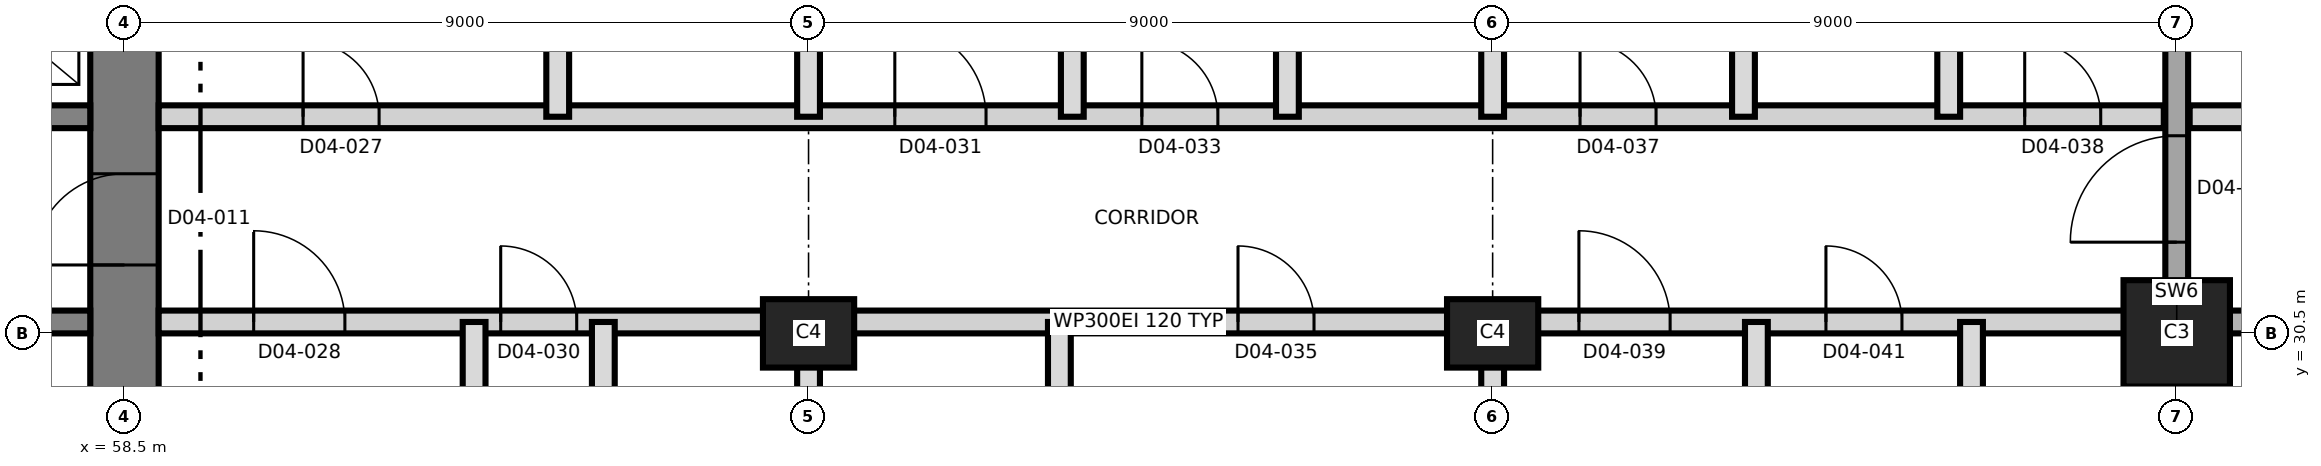
"""IFC4 building model, lengths in metres.
Left out: names, types, materials, properties, quantities, classifications, styles, units other than length and angle.
Written with IfcOpenShell. Run it as: python <this file> out.ifc"""

import sys

from ifc_helpers import new_model, si_unit, direction, frame, frame_2d, origin, origin_2d, place, context, subcontext, project, spatial, rectangle, extrude, element, fill, save


model = new_model("IFC4")
c1 = context("Model", 3, precision=1e-05, world=origin(), true_north=direction((0.0, 1.0)))
c2 = subcontext(c1, "Body", "Model", "MODEL_VIEW")
j1 = project(units=[si_unit("LENGTHUNIT", "METRE"), si_unit("PLANEANGLEUNIT", "RADIAN")], contexts=[c1])
p1 = place(None, origin())
s1 = spatial("IfcSite", under=j1, at=p1, CompositionType="ELEMENT")
p2 = place(p1, origin())
s2 = spatial("IfcBuilding", under=s1, at=p2, CompositionType="ELEMENT")
p3 = place(p2, frame((0.0, 0.0, 63.1)))
s3 = spatial("IfcBuildingStorey", under=s2, at=p3, CompositionType="ELEMENT", Elevation=63.1)
p4 = place(p3, frame((58.5, 21.05, 0.0), z_axis=(0.0, 0.0, 1.0), x_axis=(0.0, 1.0, 0.0)))
e1 = element("IfcWall", 1, at=p4, inside=s3, PredefinedType="SHEAR", context=c2, shape_type="SweptSolid", body=[
    extrude(rectangle(XDim=18.9, YDim=0.9, at=frame_2d((9.45, 0.0))), origin(), (0.0, 0.0, 1.0), 3.7),
])
p5 = place(p4, frame((10.35, 0.0, 0.0)))
e2 = element("IfcOpeningElement", 2, at=p5, cuts=e1, PredefinedType="OPENING", context=c2, shape_type="SweptSolid", body=[
    extrude(rectangle(XDim=1.2, YDim=2.1, at=frame_2d((0.6, 1.05))), frame((0.0, 0.46, 0.0), z_axis=(0.0, -1.0, 0.0), x_axis=(1.0, 0.0, 0.0)), (0.0, 0.0, 1.0), 0.92),
])
p6 = place(p3, frame((31.95, 30.65, 0.0), z_axis=(0.0, 0.0, 1.0), x_axis=(1.0, 0.0, 0.0)))
e3 = element("IfcWall", 3, at=p6, inside=s3, PredefinedType="SHEAR", context=c2, shape_type="SweptSolid", body=[
    extrude(rectangle(XDim=26.1, YDim=0.3, at=frame_2d((13.05, 0.0))), origin(), (0.0, 0.0, 1.0), 3.7),
])
p7 = place(p6, frame((24.55, 0.0, 0.0)))
e4 = element("IfcOpeningElement", 4, at=p7, cuts=e3, PredefinedType="OPENING", context=c2, shape_type="SweptSolid", body=[
    extrude(rectangle(XDim=1.0, YDim=2.1, at=frame_2d((0.5, 1.05))), frame((0.0, 0.16, 0.0), z_axis=(0.0, -1.0, 0.0), x_axis=(1.0, 0.0, 0.0)), (0.0, 0.0, 1.0), 0.32),
])
p8 = place(p6, frame((11.35, 0.0, 0.0)))
e5 = element("IfcOpeningElement", 5, at=p8, cuts=e3, PredefinedType="OPENING", context=c2, shape_type="SweptSolid", body=[
    extrude(rectangle(XDim=1.0, YDim=2.1, at=frame_2d((0.5, 1.05))), frame((0.0, 0.16, 0.0), z_axis=(0.0, -1.0, 0.0), x_axis=(1.0, 0.0, 0.0)), (0.0, 0.0, 1.0), 0.32),
])
p9 = place(p3, frame((31.95, 33.35, 0.0), z_axis=(0.0, 0.0, 1.0), x_axis=(1.0, 0.0, 0.0)))
e6 = element("IfcWall", 6, at=p9, inside=s3, PredefinedType="SHEAR", context=c2, shape_type="SweptSolid", body=[
    extrude(rectangle(XDim=26.1, YDim=0.3, at=frame_2d((13.05, 0.0))), origin(), (0.0, 0.0, 1.0), 3.7),
])
p10 = place(p9, frame((13.7, 0.0, 0.0)))
e7 = element("IfcOpeningElement", 7, at=p10, cuts=e6, PredefinedType="OPENING", context=c2, shape_type="SweptSolid", body=[
    extrude(rectangle(XDim=1.4, YDim=2.1, at=frame_2d((0.7, 1.05))), frame((0.0, 0.16, 0.0), z_axis=(0.0, -1.0, 0.0), x_axis=(1.0, 0.0, 0.0)), (0.0, 0.0, 1.0), 0.32),
])
p11 = place(p9, frame((5.175, 0.0, 0.0)))
e8 = element("IfcOpeningElement", 8, at=p11, cuts=e6, PredefinedType="OPENING", context=c2, shape_type="SweptSolid", body=[
    extrude(rectangle(XDim=1.2, YDim=2.1, at=frame_2d((0.6, 1.05))), frame((0.0, 0.16, 0.0), z_axis=(0.0, -1.0, 0.0), x_axis=(1.0, 0.0, 0.0)), (0.0, 0.0, 1.0), 0.32),
])
p12 = place(p9, frame((19.725, 0.0, 0.0)))
e9 = element("IfcOpeningElement", 9, at=p12, cuts=e6, PredefinedType="OPENING", context=c2, shape_type="SweptSolid", body=[
    extrude(rectangle(XDim=1.2, YDim=2.1, at=frame_2d((0.6, 1.05))), frame((0.0, 0.16, 0.0), z_axis=(0.0, -1.0, 0.0), x_axis=(1.0, 0.0, 0.0)), (0.0, 0.0, 1.0), 0.32),
])
for number, where, z_axis, x_axis in (
    (10, (67.5, 30.5, 0.0), (0.0, 0.0, 1.0), (1.0, 0.0, 0.0)),
    (11, (76.5, 30.5, 0.0), (0.0, 0.0, 1.0), (1.0, 0.0, 0.0)),
):
    element("IfcColumn", number, at=place(p3, frame(where, z_axis=z_axis, x_axis=x_axis)), inside=s3, PredefinedType="COLUMN", context=c2, shape_type="SweptSolid", body=[
        extrude(rectangle(XDim=1.2, YDim=0.9, at=origin_2d()), origin(), (0.0, 0.0, 1.0), 3.7),
    ])
p13 = place(p3, frame((85.5, 30.5, 0.0), z_axis=(0.0, 0.0, 1.0), x_axis=(1.0, 0.0, 0.0)))
e12 = element("IfcColumn", 12, at=p13, inside=s3, PredefinedType="COLUMN", context=c2, shape_type="SweptSolid", body=[
    extrude(rectangle(XDim=1.4, YDim=1.4, at=origin_2d()), origin(), (0.0, 0.0, 1.0), 3.7),
])
p14 = place(p3, frame((85.5, 19.17, 0.0), z_axis=(0.0, 0.0, 1.0), x_axis=(0.0, 1.0, 0.0)))
e13 = element("IfcWall", 13, at=p14, inside=s3, PredefinedType="SHEAR", context=c2, shape_type="SweptSolid", body=[
    extrude(rectangle(XDim=22.66, YDim=0.3, at=frame_2d((11.33, 0.0))), origin(), (0.0, 0.0, 1.0), 3.7),
])
p15 = place(p14, frame((12.53, 0.0, 0.0)))
e14 = element("IfcOpeningElement", 14, at=p15, cuts=e13, PredefinedType="OPENING", context=c2, shape_type="SweptSolid", body=[
    extrude(rectangle(XDim=1.4, YDim=2.1, at=frame_2d((0.7, 1.05))), frame((0.0, 0.16, 0.0), z_axis=(0.0, -1.0, 0.0), x_axis=(1.0, 0.0, 0.0)), (0.0, 0.0, 1.0), 0.32),
])
p16 = place(p3, frame((58.95, 30.65, 0.0), z_axis=(0.0, 0.0, 1.0), x_axis=(1.0, 0.0, 0.0)))
e15 = element("IfcWall", 15, at=p16, inside=s3, PredefinedType="PARTITIONING", context=c2, shape_type="SweptSolid", body=[
    extrude(rectangle(XDim=26.38, YDim=0.3, at=frame_2d((13.19, 0.0))), origin(), (0.0, 0.0, 1.0), 3.4),
])
p17 = place(p16, frame((1.25, 0.0, 0.0)))
e16 = element("IfcOpeningElement", 16, at=p17, cuts=e15, PredefinedType="OPENING", context=c2, shape_type="SweptSolid", body=[
    extrude(rectangle(XDim=1.2, YDim=2.1, at=frame_2d((0.6, 1.05))), frame((0.0, 0.16, 0.0), z_axis=(0.0, -1.0, 0.0), x_axis=(1.0, 0.0, 0.0)), (0.0, 0.0, 1.0), 0.32),
])
p18 = place(p16, frame((4.5, 0.0, 0.0)))
e17 = element("IfcOpeningElement", 17, at=p18, cuts=e15, PredefinedType="OPENING", context=c2, shape_type="SweptSolid", body=[
    extrude(rectangle(XDim=1.0, YDim=2.1, at=frame_2d((0.5, 1.05))), frame((0.0, 0.16, 0.0), z_axis=(0.0, -1.0, 0.0), x_axis=(1.0, 0.0, 0.0)), (0.0, 0.0, 1.0), 0.32),
])
p19 = place(p16, frame((14.2, 0.0, 0.0)))
e18 = element("IfcOpeningElement", 18, at=p19, cuts=e15, PredefinedType="OPENING", context=c2, shape_type="SweptSolid", body=[
    extrude(rectangle(XDim=1.0, YDim=2.4, at=frame_2d((0.5, 1.2))), frame((0.0, 0.16, 0.0), z_axis=(0.0, -1.0, 0.0), x_axis=(1.0, 0.0, 0.0)), (0.0, 0.0, 1.0), 0.32),
])
p20 = place(p16, frame((18.685, 0.0, 0.0)))
e19 = element("IfcOpeningElement", 19, at=p20, cuts=e15, PredefinedType="OPENING", context=c2, shape_type="SweptSolid", body=[
    extrude(rectangle(XDim=1.2, YDim=2.1, at=frame_2d((0.6, 1.05))), frame((0.0, 0.16, 0.0), z_axis=(0.0, -1.0, 0.0), x_axis=(1.0, 0.0, 0.0)), (0.0, 0.0, 1.0), 0.32),
])
p21 = place(p16, frame((21.935, 0.0, 0.0)))
e20 = element("IfcOpeningElement", 20, at=p21, cuts=e15, PredefinedType="OPENING", context=c2, shape_type="SweptSolid", body=[
    extrude(rectangle(XDim=1.0, YDim=2.1, at=frame_2d((0.5, 1.05))), frame((0.0, 0.16, 0.0), z_axis=(0.0, -1.0, 0.0), x_axis=(1.0, 0.0, 0.0)), (0.0, 0.0, 1.0), 0.32),
])
p22 = place(p3, frame((85.67, 30.65, 0.0), z_axis=(0.0, 0.0, 1.0), x_axis=(1.0, 0.0, 0.0)))
e21 = element("IfcWall", 21, at=p22, inside=s3, PredefinedType="SHEAR", context=c2, shape_type="SweptSolid", body=[
    extrude(rectangle(XDim=9.58, YDim=0.3, at=frame_2d((4.79, 0.0))), origin(), (0.0, 0.0, 1.0), 3.4),
])
p23 = place(p22, frame((2.08, 0.0, 0.0)))
e22 = element("IfcOpeningElement", 22, at=p23, cuts=e21, PredefinedType="OPENING", context=c2, shape_type="SweptSolid", body=[
    extrude(rectangle(XDim=1.2, YDim=2.1, at=frame_2d((0.6, 1.05))), frame((0.0, 0.16, 0.0), z_axis=(0.0, -1.0, 0.0), x_axis=(1.0, 0.0, 0.0)), (0.0, 0.0, 1.0), 0.32),
])
p24 = place(p22, frame((5.63, 0.0, 0.0)))
e23 = element("IfcOpeningElement", 23, at=p24, cuts=e21, PredefinedType="OPENING", context=c2, shape_type="SweptSolid", body=[
    extrude(rectangle(XDim=1.0, YDim=2.1, at=frame_2d((0.5, 1.05))), frame((0.0, 0.16, 0.0), z_axis=(0.0, -1.0, 0.0), x_axis=(1.0, 0.0, 0.0)), (0.0, 0.0, 1.0), 0.32),
])
p25 = place(p3, frame((58.95, 33.35, 0.0), z_axis=(0.0, 0.0, 1.0), x_axis=(1.0, 0.0, 0.0)))
e24 = element("IfcWall", 24, at=p25, inside=s3, PredefinedType="PARTITIONING", context=c2, shape_type="SweptSolid", body=[
    extrude(rectangle(XDim=26.38, YDim=0.3, at=frame_2d((13.19, 0.0))), origin(), (0.0, 0.0, 1.0), 3.4),
])
p26 = place(p25, frame((1.9, 0.0, 0.0)))
e25 = element("IfcOpeningElement", 25, at=p26, cuts=e24, PredefinedType="OPENING", context=c2, shape_type="SweptSolid", body=[
    extrude(rectangle(XDim=1.0, YDim=2.4, at=frame_2d((0.5, 1.2))), frame((0.0, 0.16, 0.0), z_axis=(0.0, -1.0, 0.0), x_axis=(1.0, 0.0, 0.0)), (0.0, 0.0, 1.0), 0.32),
])
p27 = place(p25, frame((9.685, 0.0, 0.0)))
e26 = element("IfcOpeningElement", 26, at=p27, cuts=e24, PredefinedType="OPENING", context=c2, shape_type="SweptSolid", body=[
    extrude(rectangle(XDim=1.2, YDim=2.1, at=frame_2d((0.6, 1.05))), frame((0.0, 0.16, 0.0), z_axis=(0.0, -1.0, 0.0), x_axis=(1.0, 0.0, 0.0)), (0.0, 0.0, 1.0), 0.32),
])
p28 = place(p25, frame((12.935, 0.0, 0.0)))
e27 = element("IfcOpeningElement", 27, at=p28, cuts=e24, PredefinedType="OPENING", context=c2, shape_type="SweptSolid", body=[
    extrude(rectangle(XDim=1.0, YDim=2.1, at=frame_2d((0.5, 1.05))), frame((0.0, 0.16, 0.0), z_axis=(0.0, -1.0, 0.0), x_axis=(1.0, 0.0, 0.0)), (0.0, 0.0, 1.0), 0.32),
])
p29 = place(p25, frame((18.7, 0.0, 0.0)))
e28 = element("IfcOpeningElement", 28, at=p29, cuts=e24, PredefinedType="OPENING", context=c2, shape_type="SweptSolid", body=[
    extrude(rectangle(XDim=1.0, YDim=2.1, at=frame_2d((0.5, 1.05))), frame((0.0, 0.16, 0.0), z_axis=(0.0, -1.0, 0.0), x_axis=(1.0, 0.0, 0.0)), (0.0, 0.0, 1.0), 0.32),
])
p30 = place(p25, frame((24.55, 0.0, 0.0)))
e29 = element("IfcOpeningElement", 29, at=p30, cuts=e24, PredefinedType="OPENING", context=c2, shape_type="SweptSolid", body=[
    extrude(rectangle(XDim=1.0, YDim=2.1, at=frame_2d((0.5, 1.05))), frame((0.0, 0.16, 0.0), z_axis=(0.0, -1.0, 0.0), x_axis=(1.0, 0.0, 0.0)), (0.0, 0.0, 1.0), 0.32),
])
p31 = place(p3, frame((85.67, 33.35, 0.0), z_axis=(0.0, 0.0, 1.0), x_axis=(1.0, 0.0, 0.0)))
e30 = element("IfcWall", 30, at=p31, inside=s3, PredefinedType="PARTITIONING", context=c2, shape_type="SweptSolid", body=[
    extrude(rectangle(XDim=9.58, YDim=0.3, at=frame_2d((4.79, 0.0))), origin(), (0.0, 0.0, 1.0), 3.4),
])
p32 = place(p31, frame((1.83, 0.0, 0.0)))
e31 = element("IfcOpeningElement", 31, at=p32, cuts=e30, PredefinedType="OPENING", context=c2, shape_type="SweptSolid", body=[
    extrude(rectangle(XDim=1.0, YDim=2.1, at=frame_2d((0.5, 1.05))), frame((0.0, 0.16, 0.0), z_axis=(0.0, -1.0, 0.0), x_axis=(1.0, 0.0, 0.0)), (0.0, 0.0, 1.0), 0.32),
])
p33 = place(p31, frame((5.63, 0.0, 0.0)))
e32 = element("IfcOpeningElement", 32, at=p33, cuts=e30, PredefinedType="OPENING", context=c2, shape_type="SweptSolid", body=[
    extrude(rectangle(XDim=1.0, YDim=2.1, at=frame_2d((0.5, 1.05))), frame((0.0, 0.16, 0.0), z_axis=(0.0, -1.0, 0.0), x_axis=(1.0, 0.0, 0.0)), (0.0, 0.0, 1.0), 0.32),
])
p34 = place(p3, frame((63.1, 19.17, 0.0), z_axis=(0.0, 0.0, 1.0), x_axis=(0.0, 1.0, 0.0)))
e33 = element("IfcWall", 33, at=p34, inside=s3, PredefinedType="PARTITIONING", context=c2, shape_type="SweptSolid", body=[
    extrude(rectangle(XDim=11.48, YDim=0.3, at=frame_2d((5.74, 0.0))), origin(), (0.0, 0.0, 1.0), 3.4),
])
p35 = place(p3, frame((64.2, 33.35, 0.0), z_axis=(0.0, 0.0, 1.0), x_axis=(0.0, 1.0, 0.0)))
e34 = element("IfcWall", 34, at=p35, inside=s3, PredefinedType="PARTITIONING", context=c2, shape_type="SweptSolid", body=[
    extrude(rectangle(XDim=3.5, YDim=0.3, at=frame_2d((1.75, 0.0))), origin(), (0.0, 0.0, 1.0), 3.4),
])
p36 = place(p3, frame((64.8, 27.45, 0.0), z_axis=(0.0, 0.0, 1.0), x_axis=(0.0, 1.0, 0.0)))
e35 = element("IfcWall", 35, at=p36, inside=s3, PredefinedType="PARTITIONING", context=c2, shape_type="SweptSolid", body=[
    extrude(rectangle(XDim=3.2, YDim=0.3, at=frame_2d((1.6, 0.0))), origin(), (0.0, 0.0, 1.0), 3.4),
])
p37 = place(p3, frame((67.5, 19.17, 0.0), z_axis=(0.0, 0.0, 1.0), x_axis=(0.0, 1.0, 0.0)))
e36 = element("IfcWall", 36, at=p37, inside=s3, PredefinedType="PARTITIONING", context=c2, shape_type="SweptSolid", body=[
    extrude(rectangle(XDim=11.48, YDim=0.3, at=frame_2d((5.74, 0.0))), origin(), (0.0, 0.0, 1.0), 3.4),
])
p38 = place(p3, frame((67.5, 33.35, 0.0), z_axis=(0.0, 0.0, 1.0), x_axis=(0.0, 1.0, 0.0)))
e37 = element("IfcWall", 37, at=p38, inside=s3, PredefinedType="PARTITIONING", context=c2, shape_type="SweptSolid", body=[
    extrude(rectangle(XDim=8.66, YDim=0.3, at=frame_2d((4.33, 0.0))), origin(), (0.0, 0.0, 1.0), 3.4),
])
p39 = place(p3, frame((70.8, 27.15, 0.0), z_axis=(0.0, 0.0, 1.0), x_axis=(0.0, 1.0, 0.0)))
e38 = element("IfcWall", 38, at=p39, inside=s3, PredefinedType="PARTITIONING", context=c2, shape_type="SweptSolid", body=[
    extrude(rectangle(XDim=3.5, YDim=0.3, at=frame_2d((1.75, 0.0))), origin(), (0.0, 0.0, 1.0), 3.4),
])
p40 = place(p3, frame((70.97, 33.35, 0.0), z_axis=(0.0, 0.0, 1.0), x_axis=(0.0, 1.0, 0.0)))
e39 = element("IfcWall", 39, at=p40, inside=s3, PredefinedType="PARTITIONING", context=c2, shape_type="SweptSolid", body=[
    extrude(rectangle(XDim=8.66, YDim=0.3, at=frame_2d((4.33, 0.0))), origin(), (0.0, 0.0, 1.0), 3.4),
])
p41 = place(p3, frame((73.8, 33.35, 0.0), z_axis=(0.0, 0.0, 1.0), x_axis=(0.0, 1.0, 0.0)))
e40 = element("IfcWall", 40, at=p41, inside=s3, PredefinedType="PARTITIONING", context=c2, shape_type="SweptSolid", body=[
    extrude(rectangle(XDim=3.2, YDim=0.3, at=frame_2d((1.6, 0.0))), origin(), (0.0, 0.0, 1.0), 3.4),
])
p42 = place(p3, frame((76.5, 19.17, 0.0), z_axis=(0.0, 0.0, 1.0), x_axis=(0.0, 1.0, 0.0)))
e41 = element("IfcWall", 41, at=p42, inside=s3, PredefinedType="PARTITIONING", context=c2, shape_type="SweptSolid", body=[
    extrude(rectangle(XDim=11.48, YDim=0.3, at=frame_2d((5.74, 0.0))), origin(), (0.0, 0.0, 1.0), 3.4),
])
p43 = place(p3, frame((76.5, 33.35, 0.0), z_axis=(0.0, 0.0, 1.0), x_axis=(0.0, 1.0, 0.0)))
e42 = element("IfcWall", 42, at=p43, inside=s3, PredefinedType="PARTITIONING", context=c2, shape_type="SweptSolid", body=[
    extrude(rectangle(XDim=8.66, YDim=0.3, at=frame_2d((4.33, 0.0))), origin(), (0.0, 0.0, 1.0), 3.4),
])
p44 = place(p3, frame((79.8, 33.35, 0.0), z_axis=(0.0, 0.0, 1.0), x_axis=(0.0, 1.0, 0.0)))
e43 = element("IfcWall", 43, at=p44, inside=s3, PredefinedType="PARTITIONING", context=c2, shape_type="SweptSolid", body=[
    extrude(rectangle(XDim=3.2, YDim=0.3, at=frame_2d((1.6, 0.0))), origin(), (0.0, 0.0, 1.0), 3.4),
])
p45 = place(p3, frame((79.97, 19.17, 0.0), z_axis=(0.0, 0.0, 1.0), x_axis=(0.0, 1.0, 0.0)))
e44 = element("IfcWall", 44, at=p45, inside=s3, PredefinedType="PARTITIONING", context=c2, shape_type="SweptSolid", body=[
    extrude(rectangle(XDim=11.48, YDim=0.3, at=frame_2d((5.74, 0.0))), origin(), (0.0, 0.0, 1.0), 3.4),
])
p46 = place(p3, frame((82.5, 33.35, 0.0), z_axis=(0.0, 0.0, 1.0), x_axis=(0.0, 1.0, 0.0)))
e45 = element("IfcWall", 45, at=p46, inside=s3, PredefinedType="PARTITIONING", context=c2, shape_type="SweptSolid", body=[
    extrude(rectangle(XDim=8.66, YDim=0.3, at=frame_2d((4.33, 0.0))), origin(), (0.0, 0.0, 1.0), 3.4),
])
p47 = place(p3, frame((82.8, 27.45, 0.0), z_axis=(0.0, 0.0, 1.0), x_axis=(0.0, 1.0, 0.0)))
e46 = element("IfcWall", 46, at=p47, inside=s3, PredefinedType="PARTITIONING", context=c2, shape_type="SweptSolid", body=[
    extrude(rectangle(XDim=3.2, YDim=0.3, at=frame_2d((1.6, 0.0))), origin(), (0.0, 0.0, 1.0), 3.4),
])
p48 = place(p5, origin())
e47 = element("IfcDoor", 47, at=p48, inside=s3, OperationType="SINGLE_SWING_LEFT", PredefinedType="DOOR", context=c2, shape_type="SweptSolid", body=[
    extrude(rectangle(XDim=1.2, YDim=2.1, at=frame_2d((0.6, 1.05))), frame((0.0, 0.025, 0.0), z_axis=(0.0, -1.0, 0.0), x_axis=(1.0, 0.0, 0.0)), (0.0, 0.0, 1.0), 0.05),
])
fill(e2, e47)
p49 = place(p26, origin())
e48 = element("IfcDoor", 48, at=p49, inside=s3, OperationType="SINGLE_SWING_LEFT", PredefinedType="DOOR", context=c2, shape_type="SweptSolid", body=[
    extrude(rectangle(XDim=1.0, YDim=2.4, at=frame_2d((0.5, 1.2))), frame((0.0, 0.025, 0.0), z_axis=(0.0, -1.0, 0.0), x_axis=(1.0, 0.0, 0.0)), (0.0, 0.0, 1.0), 0.05),
])
fill(e25, e48)
p50 = place(p17, origin())
e49 = element("IfcDoor", 49, at=p50, inside=s3, OperationType="SINGLE_SWING_RIGHT", PredefinedType="DOOR", context=c2, shape_type="SweptSolid", body=[
    extrude(rectangle(XDim=1.2, YDim=2.1, at=frame_2d((0.6, 1.05))), frame((0.0, 0.025, 0.0), z_axis=(0.0, -1.0, 0.0), x_axis=(1.0, 0.0, 0.0)), (0.0, 0.0, 1.0), 0.05),
])
fill(e16, e49)
p51 = place(p18, origin())
e50 = element("IfcDoor", 50, at=p51, inside=s3, OperationType="SINGLE_SWING_LEFT", PredefinedType="DOOR", context=c2, shape_type="SweptSolid", body=[
    extrude(rectangle(XDim=1.0, YDim=2.1, at=frame_2d((0.5, 1.05))), frame((0.0, 0.025, 0.0), z_axis=(0.0, -1.0, 0.0), x_axis=(1.0, 0.0, 0.0)), (0.0, 0.0, 1.0), 0.05),
])
fill(e17, e50)
p52 = place(p27, origin())
e51 = element("IfcDoor", 51, at=p52, inside=s3, OperationType="SINGLE_SWING_RIGHT", PredefinedType="DOOR", context=c2, shape_type="SweptSolid", body=[
    extrude(rectangle(XDim=1.2, YDim=2.1, at=frame_2d((0.6, 1.05))), frame((0.0, 0.025, 0.0), z_axis=(0.0, -1.0, 0.0), x_axis=(1.0, 0.0, 0.0)), (0.0, 0.0, 1.0), 0.05),
])
fill(e26, e51)
p53 = place(p28, origin())
e52 = element("IfcDoor", 52, at=p53, inside=s3, OperationType="SINGLE_SWING_LEFT", PredefinedType="DOOR", context=c2, shape_type="SweptSolid", body=[
    extrude(rectangle(XDim=1.0, YDim=2.1, at=frame_2d((0.5, 1.05))), frame((0.0, 0.025, 0.0), z_axis=(0.0, -1.0, 0.0), x_axis=(1.0, 0.0, 0.0)), (0.0, 0.0, 1.0), 0.05),
])
fill(e27, e52)
p54 = place(p19, origin())
e53 = element("IfcDoor", 53, at=p54, inside=s3, OperationType="SINGLE_SWING_RIGHT", PredefinedType="DOOR", context=c2, shape_type="SweptSolid", body=[
    extrude(rectangle(XDim=1.0, YDim=2.4, at=frame_2d((0.5, 1.2))), frame((0.0, 0.025, 0.0), z_axis=(0.0, -1.0, 0.0), x_axis=(1.0, 0.0, 0.0)), (0.0, 0.0, 1.0), 0.05),
])
fill(e18, e53)
p55 = place(p29, origin())
e54 = element("IfcDoor", 54, at=p55, inside=s3, OperationType="SINGLE_SWING_LEFT", PredefinedType="DOOR", context=c2, shape_type="SweptSolid", body=[
    extrude(rectangle(XDim=1.0, YDim=2.1, at=frame_2d((0.5, 1.05))), frame((0.0, 0.025, 0.0), z_axis=(0.0, -1.0, 0.0), x_axis=(1.0, 0.0, 0.0)), (0.0, 0.0, 1.0), 0.05),
])
fill(e28, e54)
p56 = place(p30, origin())
e55 = element("IfcDoor", 55, at=p56, inside=s3, OperationType="SINGLE_SWING_LEFT", PredefinedType="DOOR", context=c2, shape_type="SweptSolid", body=[
    extrude(rectangle(XDim=1.0, YDim=2.1, at=frame_2d((0.5, 1.05))), frame((0.0, 0.025, 0.0), z_axis=(0.0, -1.0, 0.0), x_axis=(1.0, 0.0, 0.0)), (0.0, 0.0, 1.0), 0.05),
])
fill(e29, e55)
p57 = place(p20, origin())
e56 = element("IfcDoor", 56, at=p57, inside=s3, OperationType="SINGLE_SWING_LEFT", PredefinedType="DOOR", context=c2, shape_type="SweptSolid", body=[
    extrude(rectangle(XDim=1.2, YDim=2.1, at=frame_2d((0.6, 1.05))), frame((0.0, 0.025, 0.0), z_axis=(0.0, -1.0, 0.0), x_axis=(1.0, 0.0, 0.0)), (0.0, 0.0, 1.0), 0.05),
])
fill(e19, e56)
p58 = place(p21, origin())
e57 = element("IfcDoor", 57, at=p58, inside=s3, OperationType="SINGLE_SWING_RIGHT", PredefinedType="DOOR", context=c2, shape_type="SweptSolid", body=[
    extrude(rectangle(XDim=1.0, YDim=2.1, at=frame_2d((0.5, 1.05))), frame((0.0, 0.025, 0.0), z_axis=(0.0, -1.0, 0.0), x_axis=(1.0, 0.0, 0.0)), (0.0, 0.0, 1.0), 0.05),
])
fill(e20, e57)
p59 = place(p15, origin())
e58 = element("IfcDoor", 58, at=p59, inside=s3, OperationType="SINGLE_SWING_RIGHT", PredefinedType="DOOR", context=c2, shape_type="SweptSolid", body=[
    extrude(rectangle(XDim=1.4, YDim=2.1, at=frame_2d((0.7, 1.05))), frame((0.0, 0.025, 0.0), z_axis=(0.0, -1.0, 0.0), x_axis=(1.0, 0.0, 0.0)), (0.0, 0.0, 1.0), 0.05),
])
fill(e14, e58)
save(model, sys.argv[1])
